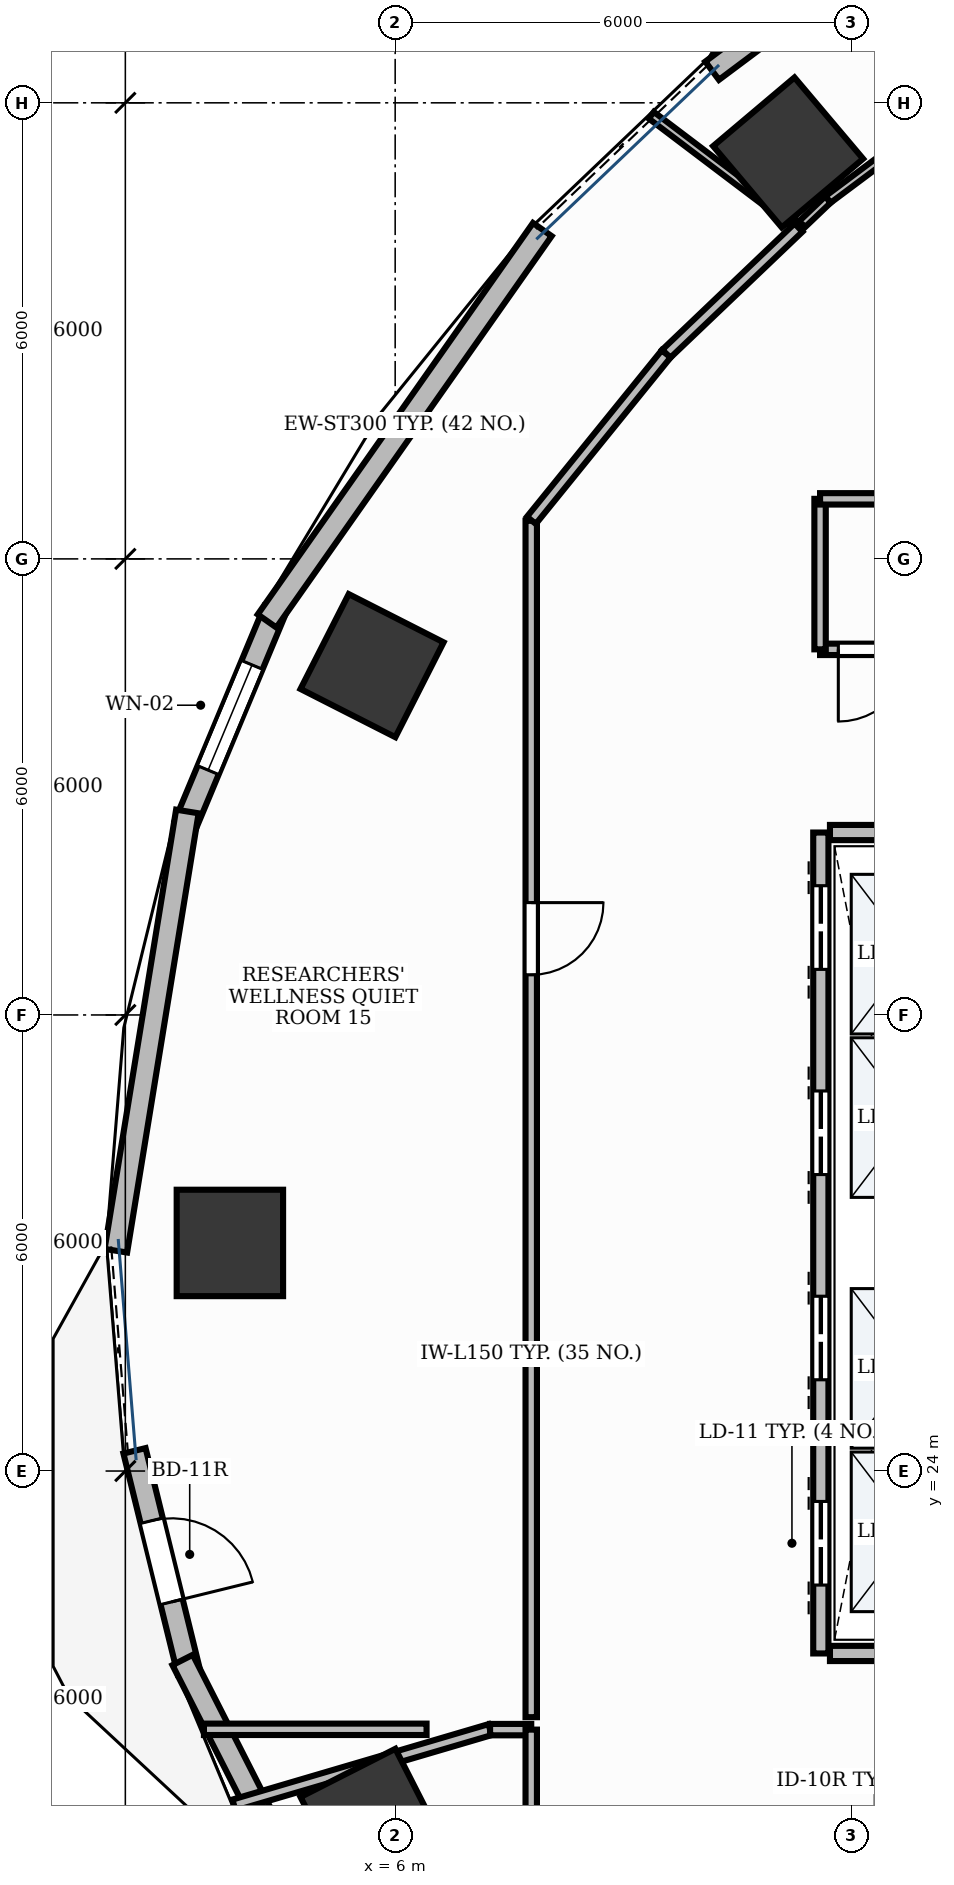
"""IFC4 building model, lengths in metres.
Left out: names, types, materials, properties, quantities, classifications, styles, units other than length and angle.
Written with IfcOpenShell. Run it as: python <this file> out.ifc"""

import sys

from ifc_helpers import new_model, si_unit, direction, frame, frame_2d, origin, origin_2d, place, context, subcontext, project, spatial, rectangle, extrude, element, fill, save


model = new_model("IFC4")
c1 = context("Model", 3, precision=1e-05, world=origin(), true_north=direction((0.0, 1.0)))
c2 = subcontext(c1, "Body", "Model", "MODEL_VIEW")
j1 = project(units=[si_unit("LENGTHUNIT", "METRE"), si_unit("PLANEANGLEUNIT", "RADIAN")], contexts=[c1])
p1 = place(None, origin())
s1 = spatial("IfcSite", under=j1, at=p1, CompositionType="ELEMENT")
p2 = place(p1, origin())
s2 = spatial("IfcBuilding", under=s1, at=p2, CompositionType="ELEMENT")
p3 = place(p2, frame((0.0, 0.0, 38.4)))
s3 = spatial("IfcBuildingStorey", under=s2, at=p3, CompositionType="ELEMENT", Elevation=38.4)
for number, where, z_axis, x_axis in (
    (1, (11.17, 41.347, -0.0), (0.0, 0.0, 1.0), (0.764, 0.645, 0.0)),
    (2, (5.696, 34.596, -0.0), (0.0, 0.0, 1.0), (0.453, 0.891, 0.0)),
    (3, (3.825, 27.001, -0.0), (0.0, 0.0, 1.0), (0.0, 1.0, 0.0)),
    (4, (5.696, 19.404, -0.0), (0.0, 0.0, 1.0), (-0.453, 0.891, 0.0)),
):
    element("IfcColumn", number, at=place(p3, frame(where, z_axis=z_axis, x_axis=x_axis)), inside=s3, PredefinedType="COLUMN", context=c2, shape_type="SweptSolid", body=[
        extrude(rectangle(XDim=1.4, YDim=1.4, at=origin_2d()), origin(), (0.0, 0.0, 1.0), 3.901),
    ])
p4 = place(p3, frame((12.957, 44.507, 0.0), z_axis=(0.0, 0.0, 1.0), x_axis=(-0.800798896088, -0.59893332519, 0.0)))
e5 = element("IfcWall", 5, at=p4, inside=s3, PredefinedType="STANDARD", context=c2, shape_type="SweptSolid", body=[
    extrude(rectangle(XDim=3.481, YDim=0.3, at=frame_2d((1.74, 0.0))), origin(), (0.0, 0.0, 1.0), 3.9),
])
p5 = place(p4, frame((0.99, 0.0, 0.95)))
e6 = element("IfcOpeningElement", 6, at=p5, cuts=e5, PredefinedType="OPENING", context=c2, shape_type="SweptSolid", body=[
    extrude(rectangle(XDim=1.5, YDim=1.8, at=frame_2d((0.75, 0.9))), frame((0.0, 0.165, 0.0), z_axis=(0.0, -1.0, 0.0), x_axis=(1.0, 0.0, 0.0)), (0.0, 0.0, 1.0), 0.33),
])
p6 = place(p3, frame((4.417, 35.323, 0.0), z_axis=(0.0, 0.0, 1.0), x_axis=(-0.385358473275, -0.92276695166, 0.0)))
e7 = element("IfcWall", 7, at=p6, inside=s3, PredefinedType="STANDARD", context=c2, shape_type="SweptSolid", body=[
    extrude(rectangle(XDim=3.056, YDim=0.3, at=frame_2d((1.528, 0.0))), origin(), (0.0, 0.0, 1.0), 3.47),
])
p7 = place(p6, frame((0.778, 0.0, 0.95)))
e8 = element("IfcOpeningElement", 8, at=p7, cuts=e7, PredefinedType="OPENING", context=c2, shape_type="SweptSolid", body=[
    extrude(rectangle(XDim=1.5, YDim=1.8, at=frame_2d((0.75, 0.9))), frame((0.0, 0.165, 0.0), z_axis=(0.0, -1.0, 0.0), x_axis=(1.0, 0.0, 0.0)), (0.0, 0.0, 1.0), 0.33),
])
p8 = place(p3, frame((2.571, 24.266, 0.0), z_axis=(0.0, 0.0, 1.0), x_axis=(0.238522035896, -0.971137085273, 0.0)))
e9 = element("IfcWall", 9, at=p8, inside=s3, PredefinedType="STANDARD", context=c2, shape_type="SweptSolid", body=[
    extrude(rectangle(XDim=2.993, YDim=0.3, at=frame_2d((1.497, 0.0))), origin(), (0.0, 0.0, 1.0), 3.9),
])
p9 = place(p8, frame((0.946, 0.0, 0.0)))
e10 = element("IfcOpeningElement", 10, at=p9, cuts=e9, PredefinedType="OPENING", context=c2, shape_type="SweptSolid", body=[
    extrude(rectangle(XDim=1.1, YDim=2.15, at=frame_2d((0.55, 1.075))), frame((0.0, 0.165, 0.0), z_axis=(0.0, -1.0, 0.0), x_axis=(1.0, 0.0, 0.0)), (0.0, 0.0, 1.0), 0.33),
])
p10 = place(p3, frame((7.936, 40.333, 0.0), z_axis=(0.0, 0.0, 1.0), x_axis=(-0.575165804445, -0.818036855769, 0.0)))
e11 = element("IfcWall", 11, at=p10, inside=s3, PredefinedType="STANDARD", context=c2, shape_type="SweptSolid", body=[
    extrude(rectangle(XDim=6.296, YDim=0.3, at=frame_2d((3.148, 0.0))), origin(), (0.0, 0.0, 1.0), 3.9),
])
p11 = place(p3, frame((3.266, 32.677, 0.0), z_axis=(0.0, 0.0, 1.0), x_axis=(-0.160712446639, -0.987001271273, 0.0)))
e12 = element("IfcWall", 12, at=p11, inside=s3, PredefinedType="STANDARD", context=c2, shape_type="SweptSolid", body=[
    extrude(rectangle(XDim=5.855, YDim=0.3, at=frame_2d((2.927, 0.0))), origin(), (0.0, 0.0, 1.0), 3.47),
])
p12 = place(p3, frame((3.204, 21.514, 0.0), z_axis=(0.0, 0.0, 1.0), x_axis=(0.453093111502, -0.891463197395, 0.0)))
e13 = element("IfcWall", 13, at=p12, inside=s3, PredefinedType="STANDARD", context=c2, shape_type="SweptSolid", body=[
    extrude(rectangle(XDim=6.102, YDim=0.3, at=frame_2d((3.051, 0.0))), origin(), (0.0, 0.0, 1.0), 3.9),
])
p13 = place(p3, frame((11.6, 21.6, 0.0), z_axis=(0.0, 0.0, 1.0), x_axis=(0.0, 1.0, 0.0)))
e14 = element("IfcWall", 14, at=p13, inside=s3, PredefinedType="PARTITIONING", context=c2, shape_type="SweptSolid", body=[
    extrude(rectangle(XDim=10.8, YDim=0.2, at=frame_2d((5.4, 0.0))), origin(), (0.0, 0.0, 1.0), 2.91),
])
p14 = place(p13, frame((0.9, 0.0, 0.0)))
e15 = element("IfcOpeningElement", 15, at=p14, cuts=e14, PredefinedType="OPENING", context=c2, shape_type="SweptSolid", body=[
    extrude(rectangle(XDim=1.1, YDim=2.2, at=frame_2d((0.55, 1.1))), frame((0.0, 0.115, 0.0), z_axis=(0.0, -1.0, 0.0), x_axis=(1.0, 0.0, 0.0)), (0.0, 0.0, 1.0), 0.23),
])
p15 = place(p13, frame((3.6, 0.0, 0.0)))
e16 = element("IfcOpeningElement", 16, at=p15, cuts=e14, PredefinedType="OPENING", context=c2, shape_type="SweptSolid", body=[
    extrude(rectangle(XDim=1.1, YDim=2.2, at=frame_2d((0.55, 1.1))), frame((0.0, 0.115, 0.0), z_axis=(0.0, -1.0, 0.0), x_axis=(1.0, 0.0, 0.0)), (0.0, 0.0, 1.0), 0.23),
])
p16 = place(p13, frame((6.3, 0.0, 0.0)))
e17 = element("IfcOpeningElement", 17, at=p16, cuts=e14, PredefinedType="OPENING", context=c2, shape_type="SweptSolid", body=[
    extrude(rectangle(XDim=1.1, YDim=2.2, at=frame_2d((0.55, 1.1))), frame((0.0, 0.115, 0.0), z_axis=(0.0, -1.0, 0.0), x_axis=(1.0, 0.0, 0.0)), (0.0, 0.0, 1.0), 0.23),
])
p17 = place(p13, frame((9.0, 0.0, 0.0)))
e18 = element("IfcOpeningElement", 18, at=p17, cuts=e14, PredefinedType="OPENING", context=c2, shape_type="SweptSolid", body=[
    extrude(rectangle(XDim=1.1, YDim=2.2, at=frame_2d((0.55, 1.1))), frame((0.0, 0.115, 0.0), z_axis=(0.0, -1.0, 0.0), x_axis=(1.0, 0.0, 0.0)), (0.0, 0.0, 1.0), 0.23),
])
for number, where, z_axis, x_axis in (
    (19, (11.72, 21.6, 0.0), (0.0, 0.0, 1.0), (1.0, 0.0, 0.0)),
    (20, (11.72, 32.4, 0.0), (0.0, 0.0, 1.0), (1.0, 0.0, 0.0)),
):
    element("IfcWall", number, at=place(p3, frame(where, z_axis=z_axis, x_axis=x_axis)), inside=s3, PredefinedType="PARTITIONING", context=c2, shape_type="SweptSolid", body=[
        extrude(rectangle(XDim=2.16, YDim=0.2, at=frame_2d((1.08, 0.0))), origin(), (0.0, 0.0, 1.0), 2.91),
    ])
p18 = place(p3, frame((21.74, 34.81, 0.0), z_axis=(0.0, 0.0, 1.0), x_axis=(-1.0, 0.0, 0.0)))
e21 = element("IfcWall", 21, at=p18, inside=s3, PredefinedType="PARTITIONING", context=c2, shape_type="SweptSolid", body=[
    extrude(rectangle(XDim=10.15, YDim=0.15, at=frame_2d((5.075, 0.0))), origin(), (0.0, 0.0, 1.0), 2.91),
])
p19 = place(p18, frame((8.96, 0.0, 0.0)))
e22 = element("IfcOpeningElement", 22, at=p19, cuts=e21, PredefinedType="OPENING", context=c2, shape_type="SweptSolid", body=[
    extrude(rectangle(XDim=0.95, YDim=2.15, at=frame_2d((0.475, 1.075))), frame((0.0, 0.09, 0.0), z_axis=(0.0, -1.0, 0.0), x_axis=(1.0, 0.0, 0.0)), (0.0, 0.0, 1.0), 0.18),
])
p20 = place(p3, frame((7.79, 36.501, 0.0), z_axis=(0.0, 0.0, 1.0), x_axis=(0.0, -1.0, 0.0)))
e23 = element("IfcWall", 23, at=p20, inside=s3, PredefinedType="PARTITIONING", context=c2, shape_type="SweptSolid", body=[
    extrude(rectangle(XDim=15.74, YDim=0.15, at=frame_2d((7.87, 0.0))), origin(), (0.0, 0.0, 1.0), 2.91),
])
p21 = place(p20, frame((5.023, 0.0, 0.0)))
e24 = element("IfcOpeningElement", 24, at=p21, cuts=e23, PredefinedType="OPENING", context=c2, shape_type="SweptSolid", body=[
    extrude(rectangle(XDim=0.95, YDim=2.15, at=frame_2d((0.475, 1.075))), frame((0.0, 0.09, 0.0), z_axis=(0.0, -1.0, 0.0), x_axis=(1.0, 0.0, 0.0)), (0.0, 0.0, 1.0), 0.18),
])
p22 = place(p3, frame((3.879, 19.605, 0.0), z_axis=(0.0, 0.0, 1.0), x_axis=(0.959249199887, 0.282561449097, 0.0)))
e25 = element("IfcWall", 25, at=p22, inside=s3, PredefinedType="PARTITIONING", context=c2, shape_type="SweptSolid", body=[
    extrude(rectangle(XDim=3.512, YDim=0.15, at=frame_2d((1.756, 0.0))), origin(), (0.0, 0.0, 1.0), 2.91),
])
p23 = place(p3, frame((7.249, 20.598, 0.0), z_axis=(0.0, 0.0, 1.0), x_axis=(1.0, 0.0, 0.0)))
e26 = element("IfcWall", 26, at=p23, inside=s3, PredefinedType="PARTITIONING", context=c2, shape_type="SweptSolid", body=[
    extrude(rectangle(XDim=0.542, YDim=0.15, at=frame_2d((0.271, 0.0))), origin(), (0.0, 0.0, 1.0), 2.91),
])
p24 = place(p3, frame((7.79, 20.598, 0.0), z_axis=(0.0, 0.0, 1.0), x_axis=(0.0, -1.0, 0.0)))
e27 = element("IfcWall", 27, at=p24, inside=s3, PredefinedType="PARTITIONING", context=c2, shape_type="SweptSolid", body=[
    extrude(rectangle(XDim=3.099, YDim=0.15, at=frame_2d((1.55, 0.0))), origin(), (0.0, 0.0, 1.0), 2.91),
])
p25 = place(p3, frame((14.16, 42.572, 0.0), z_axis=(0.0, 0.0, 1.0), x_axis=(-0.800808090092, -0.598921032227, 0.0)))
e28 = element("IfcWall", 28, at=p25, inside=s3, PredefinedType="MOVABLE", context=c2, shape_type="SweptSolid", body=[
    extrude(rectangle(XDim=3.079, YDim=0.11, at=frame_2d((1.54, 0.0))), origin(), (0.0, 0.0, 1.0), 2.91),
])
p26 = place(p3, frame((11.693, 40.727, 0.0), z_axis=(0.0, 0.0, 1.0), x_axis=(-0.72367263626, -0.690143402148, 0.0)))
e29 = element("IfcWall", 29, at=p26, inside=s3, PredefinedType="MOVABLE", context=c2, shape_type="SweptSolid", body=[
    extrude(rectangle(XDim=0.524, YDim=0.11, at=frame_2d((0.262, 0.0))), origin(), (0.0, 0.0, 1.0), 2.91),
])
p27 = place(p3, frame((11.314, 40.365, 0.0), z_axis=(0.0, 0.0, 1.0), x_axis=(-0.797445450475, 0.603391045274, 0.0)))
e30 = element("IfcWall", 30, at=p27, inside=s3, PredefinedType="MOVABLE", context=c2, shape_type="SweptSolid", body=[
    extrude(rectangle(XDim=2.438, YDim=0.11, at=frame_2d((1.219, 0.0))), origin(), (0.0, 0.0, 1.0), 2.91),
])
p28 = place(p3, frame((11.59, 34.81, 0.0), z_axis=(0.0, 0.0, 1.0), x_axis=(0.0, 1.0, 0.0)))
e31 = element("IfcWall", 31, at=p28, inside=s3, PredefinedType="PARTITIONING", context=c2, shape_type="SweptSolid", body=[
    extrude(rectangle(XDim=1.98, YDim=0.15, at=frame_2d((0.99, 0.0))), origin(), (0.0, 0.0, 1.0), 2.91),
])
p29 = place(p3, frame((11.59, 36.79, 0.0), z_axis=(0.0, 0.0, 1.0), x_axis=(1.0, 0.0, 0.0)))
e32 = element("IfcWall", 32, at=p29, inside=s3, PredefinedType="PARTITIONING", context=c2, shape_type="SweptSolid", body=[
    extrude(rectangle(XDim=5.21, YDim=0.15, at=frame_2d((2.605, 0.0))), origin(), (0.0, 0.0, 1.0), 2.91),
])
p30 = place(p3, frame((11.307, 40.358, 0.0), z_axis=(0.0, 0.0, 1.0), x_axis=(-0.723655021688, -0.690161872017, 0.0)))
e33 = element("IfcWall", 33, at=p30, inside=s3, PredefinedType="PARTITIONING", context=c2, shape_type="SweptSolid", body=[
    extrude(rectangle(XDim=2.406, YDim=0.15, at=frame_2d((1.203, 0.0))), origin(), (0.0, 0.0, 1.0), 2.91),
])
p31 = place(p3, frame((9.565, 38.697, 0.0), z_axis=(0.0, 0.0, 1.0), x_axis=(-0.629270515505, -0.777186347227, 0.0)))
e34 = element("IfcWall", 34, at=p31, inside=s3, PredefinedType="PARTITIONING", context=c2, shape_type="SweptSolid", body=[
    extrude(rectangle(XDim=2.817, YDim=0.15, at=frame_2d((1.409, 0.0))), origin(), (0.0, 0.0, 1.0), 2.91),
])
p32 = place(p3, frame((6.413, 20.602, 0.0), z_axis=(0.0, 0.0, 1.0), x_axis=(-1.0, 0.0, 0.0)))
e35 = element("IfcWall", 35, at=p32, inside=s3, PredefinedType="PARTITIONING", context=c2, shape_type="SweptSolid", body=[
    extrude(rectangle(XDim=2.929, YDim=0.15, at=frame_2d((1.464, 0.0))), origin(), (0.0, 0.0, 1.0), 2.91),
])
p33 = place(p7, origin())
e36 = element("IfcWindow", 36, at=p33, inside=s3, PartitioningType="DOUBLE_PANEL_VERTICAL", PredefinedType="WINDOW", context=c2, shape_type="SweptSolid", body=[
    extrude(rectangle(XDim=1.5, YDim=1.8, at=frame_2d((0.75, 0.9))), frame((0.0, 0.03, 0.0), z_axis=(0.0, -1.0, 0.0), x_axis=(1.0, 0.0, 0.0)), (0.0, 0.0, 1.0), 0.06),
])
fill(e8, e36)
p34 = place(p9, origin())
e37 = element("IfcDoor", 37, at=p34, inside=s3, OperationType="SINGLE_SWING_RIGHT", PredefinedType="DOOR", context=c2, shape_type="SweptSolid", body=[
    extrude(rectangle(XDim=1.1, YDim=2.15, at=frame_2d((0.55, 1.075))), frame((0.0, 0.025, 0.0), z_axis=(0.0, -1.0, 0.0), x_axis=(1.0, 0.0, 0.0)), (0.0, 0.0, 1.0), 0.05),
])
fill(e10, e37)
p35 = place(p14, origin())
e38 = element("IfcDoor", 38, at=p35, inside=s3, OperationType="DOUBLE_DOOR_SLIDING", PredefinedType="DOOR", context=c2, shape_type="SweptSolid", body=[
    extrude(rectangle(XDim=1.1, YDim=2.2, at=frame_2d((0.55, 1.1))), frame((0.0, 0.025, 0.0), z_axis=(0.0, -1.0, 0.0), x_axis=(1.0, 0.0, 0.0)), (0.0, 0.0, 1.0), 0.05),
])
fill(e15, e38)
p36 = place(p15, origin())
e39 = element("IfcDoor", 39, at=p36, inside=s3, OperationType="DOUBLE_DOOR_SLIDING", PredefinedType="DOOR", context=c2, shape_type="SweptSolid", body=[
    extrude(rectangle(XDim=1.1, YDim=2.2, at=frame_2d((0.55, 1.1))), frame((0.0, 0.025, 0.0), z_axis=(0.0, -1.0, 0.0), x_axis=(1.0, 0.0, 0.0)), (0.0, 0.0, 1.0), 0.05),
])
fill(e16, e39)
p37 = place(p16, origin())
e40 = element("IfcDoor", 40, at=p37, inside=s3, OperationType="DOUBLE_DOOR_SLIDING", PredefinedType="DOOR", context=c2, shape_type="SweptSolid", body=[
    extrude(rectangle(XDim=1.1, YDim=2.2, at=frame_2d((0.55, 1.1))), frame((0.0, 0.025, 0.0), z_axis=(0.0, -1.0, 0.0), x_axis=(1.0, 0.0, 0.0)), (0.0, 0.0, 1.0), 0.05),
])
fill(e17, e40)
p38 = place(p17, origin())
e41 = element("IfcDoor", 41, at=p38, inside=s3, OperationType="DOUBLE_DOOR_SLIDING", PredefinedType="DOOR", context=c2, shape_type="SweptSolid", body=[
    extrude(rectangle(XDim=1.1, YDim=2.2, at=frame_2d((0.55, 1.1))), frame((0.0, 0.025, 0.0), z_axis=(0.0, -1.0, 0.0), x_axis=(1.0, 0.0, 0.0)), (0.0, 0.0, 1.0), 0.05),
])
fill(e18, e41)
p39 = place(p19, origin())
e42 = element("IfcDoor", 42, at=p39, inside=s3, OperationType="SINGLE_SWING_RIGHT", PredefinedType="DOOR", context=c2, shape_type="SweptSolid", body=[
    extrude(rectangle(XDim=0.95, YDim=2.15, at=frame_2d((0.475, 1.075))), frame((0.0, 0.025, 0.0), z_axis=(0.0, -1.0, 0.0), x_axis=(1.0, 0.0, 0.0)), (0.0, 0.0, 1.0), 0.05),
])
fill(e22, e42)
p40 = place(p21, origin())
e43 = element("IfcDoor", 43, at=p40, inside=s3, OperationType="SINGLE_SWING_LEFT", PredefinedType="DOOR", context=c2, shape_type="SweptSolid", body=[
    extrude(rectangle(XDim=0.95, YDim=2.15, at=frame_2d((0.475, 1.075))), frame((0.0, 0.025, 0.0), z_axis=(0.0, -1.0, 0.0), x_axis=(1.0, 0.0, 0.0)), (0.0, 0.0, 1.0), 0.05),
])
fill(e24, e43)
save(model, sys.argv[1])
